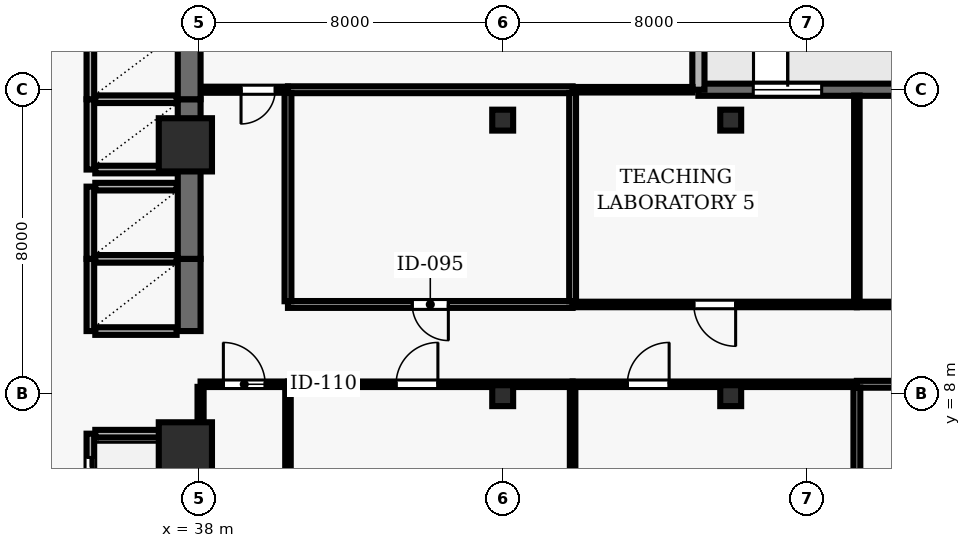
"""IFC4 building model, lengths in metres.
Left out: names, types, materials, properties, quantities, classifications, styles, units other than length and angle.
Written with IfcOpenShell. Run it as: python <this file> out.ifc"""

import sys

from ifc_helpers import new_model, si_unit, direction, frame, frame_2d, origin, origin_2d, place, context, subcontext, project, spatial, rectangle, hollow_rectangle, extrude, element, fill, save


model = new_model("IFC4")
c1 = context("Model", 3, precision=1e-05, world=origin(), true_north=direction((0.0, 1.0)))
c2 = subcontext(c1, "Body", "Model", "MODEL_VIEW")
j1 = project(units=[si_unit("LENGTHUNIT", "METRE"), si_unit("PLANEANGLEUNIT", "RADIAN")], contexts=[c1])
p1 = place(None, origin())
s1 = spatial("IfcSite", under=j1, at=p1, CompositionType="ELEMENT")
p2 = place(p1, origin())
s2 = spatial("IfcBuilding", under=s1, at=p2, CompositionType="ELEMENT")
p3 = place(p2, frame((0.0, 0.0, 62.2)))
s3 = spatial("IfcBuildingStorey", under=s2, at=p3, CompositionType="ELEMENT", Elevation=62.2)
for number, where, z_axis, x_axis in (
    (1, (37.65, 6.55, 0.0), (0.0, 0.0, 1.0), (1.0, 0.0, 0.0)),
    (2, (37.65, 14.55, 0.0), (0.0, 0.0, 1.0), (1.0, 0.0, 0.0)),
):
    element("IfcColumn", number, at=place(p3, frame(where, z_axis=z_axis, x_axis=x_axis)), inside=s3, PredefinedType="COLUMN", context=c2, shape_type="SweptSolid", body=[
        extrude(rectangle(XDim=1.4, YDim=1.4, at=origin_2d()), origin(), (0.0, 0.0, 1.0), 3.9),
    ])
for number, where, z_axis, x_axis in (
    (3, (46.0, 7.95, 0.0), (0.0, 0.0, 1.0), (1.0, 0.0, 0.0)),
    (4, (46.0, 15.2, 0.0), (0.0, 0.0, 1.0), (1.0, 0.0, 0.0)),
    (5, (52.0, 7.95, 0.0), (0.0, 0.0, 1.0), (1.0, 0.0, 0.0)),
    (6, (52.0, 15.2, 0.0), (0.0, 0.0, 1.0), (1.0, 0.0, 0.0)),
):
    element("IfcColumn", number, at=place(p3, frame(where, z_axis=z_axis, x_axis=x_axis)), inside=s3, PredefinedType="COLUMN", context=c2, shape_type="SweptSolid", body=[
        extrude(hollow_rectangle(XDim=0.55, YDim=0.55, WallThickness=0.025, at=origin_2d()), origin(), (0.0, 0.0, 1.0), 3.9),
    ])
p4 = place(p3, frame((73.5, 16.0, 0.0), z_axis=(0.0, 0.0, 1.0), x_axis=(-1.0, 0.0, 0.0)))
e7 = element("IfcWall", 7, at=p4, inside=s3, PredefinedType="SOLIDWALL", context=c2, shape_type="SweptSolid", body=[
    extrude(rectangle(XDim=22.35, YDim=0.32, at=frame_2d((11.175, 0.0))), origin(), (0.0, 0.0, 1.0), 3.69),
])
p5 = place(p4, frame((12.05, 0.0, 0.0)))
e8 = element("IfcOpeningElement", 8, at=p5, cuts=e7, PredefinedType="OPENING", context=c2, shape_type="SweptSolid", body=[
    extrude(rectangle(XDim=1.0, YDim=2.2, at=frame_2d((0.5, 1.1))), frame((0.0, 0.17, 0.0), z_axis=(0.0, -1.0, 0.0), x_axis=(1.0, 0.0, 0.0)), (0.0, 0.0, 1.0), 0.34),
])
p6 = place(p4, frame((1.444, 0.0, 0.9)))
e9 = element("IfcOpeningElement", 9, at=p6, cuts=e7, PredefinedType="OPENING", context=c2, shape_type="SweptSolid", body=[
    extrude(rectangle(XDim=1.8, YDim=1.8, at=frame_2d((0.9, 0.9))), frame((0.0, 0.17, 0.0), z_axis=(0.0, -1.0, 0.0), x_axis=(1.0, 0.0, 0.0)), (0.0, 0.0, 1.0), 0.34),
])
p7 = place(p4, frame((7.481, 0.0, 0.9)))
e10 = element("IfcOpeningElement", 10, at=p7, cuts=e7, PredefinedType="OPENING", context=c2, shape_type="SweptSolid", body=[
    extrude(rectangle(XDim=1.8, YDim=1.8, at=frame_2d((0.9, 0.9))), frame((0.0, 0.17, 0.0), z_axis=(0.0, -1.0, 0.0), x_axis=(1.0, 0.0, 0.0)), (0.0, 0.0, 1.0), 0.34),
])
p8 = place(p4, frame((19.106, 0.0, 0.9)))
e11 = element("IfcOpeningElement", 11, at=p8, cuts=e7, PredefinedType="OPENING", context=c2, shape_type="SweptSolid", body=[
    extrude(rectangle(XDim=1.8, YDim=1.8, at=frame_2d((0.9, 0.9))), frame((0.0, 0.17, 0.0), z_axis=(0.0, -1.0, 0.0), x_axis=(1.0, 0.0, 0.0)), (0.0, 0.0, 1.0), 0.34),
])
p9 = place(p3, frame((51.15, 16.0, 0.0), z_axis=(0.0, 0.0, 1.0), x_axis=(0.0, 1.0, 0.0)))
e12 = element("IfcWall", 12, at=p9, inside=s3, PredefinedType="SOLIDWALL", context=c2, shape_type="SweptSolid", body=[
    extrude(rectangle(XDim=9.442, YDim=0.32, at=frame_2d((4.721, 0.0))), origin(), (0.0, 0.0, 1.0), 3.69),
])
p10 = place(p9, frame((4.046, 0.0, 0.0)))
e13 = element("IfcOpeningElement", 13, at=p10, cuts=e12, PredefinedType="OPENING", context=c2, shape_type="SweptSolid", body=[
    extrude(rectangle(XDim=1.35, YDim=2.2, at=frame_2d((0.675, 1.1))), frame((0.0, 0.17, 0.0), z_axis=(0.0, -1.0, 0.0), x_axis=(1.0, 0.0, 0.0)), (0.0, 0.0, 1.0), 0.34),
])
p11 = place(p3, frame((35.15, 6.95, 0.0), z_axis=(0.0, 0.0, 1.0), x_axis=(0.0, -1.0, 0.0)))
e14 = element("IfcWall", 14, at=p11, inside=s3, PredefinedType="SOLIDWALL", context=c2, shape_type="SweptSolid", body=[
    extrude(rectangle(XDim=2.25, YDim=0.2, at=frame_2d((1.125, 0.0))), origin(), (0.0, 0.0, 1.0), 3.69),
])
p12 = place(p11, frame((0.625, 0.0, 0.0)))
e15 = element("IfcOpeningElement", 15, at=p12, cuts=e14, PredefinedType="OPENING", context=c2, shape_type="SweptSolid", body=[
    extrude(rectangle(XDim=1.0, YDim=2.1, at=frame_2d((0.5, 1.05))), frame((0.0, 0.11, 0.0), z_axis=(0.0, -1.0, 0.0), x_axis=(1.0, 0.0, 0.0)), (0.0, 0.0, 1.0), 0.22),
])
p13 = place(p3, frame((37.75, 4.7, 0.0), z_axis=(0.0, 0.0, 1.0), x_axis=(0.0, 1.0, 0.0)))
e16 = element("IfcWall", 16, at=p13, inside=s3, PredefinedType="SHEAR", context=c2, shape_type="SweptSolid", body=[
    extrude(rectangle(XDim=2.25, YDim=0.6, at=frame_2d((1.125, 0.0))), origin(), (0.0, 0.0, 1.0), 3.69),
])
p14 = place(p3, frame((37.42, 6.95, 0.0), z_axis=(0.0, 0.0, 1.0), x_axis=(-1.0, 0.0, 0.0)))
e17 = element("IfcWall", 17, at=p14, inside=s3, PredefinedType="SOLIDWALL", context=c2, shape_type="SweptSolid", body=[
    extrude(rectangle(XDim=2.14, YDim=0.2, at=frame_2d((1.07, 0.0))), origin(), (0.0, 0.0, 1.0), 3.69),
])
p15 = place(p3, frame((35.15, 11.55, 0.0), z_axis=(0.0, 0.0, 1.0), x_axis=(0.0, -1.0, 0.0)))
e18 = element("IfcWall", 18, at=p15, inside=s3, PredefinedType="SOLIDWALL", context=c2, shape_type="SweptSolid", body=[
    extrude(rectangle(XDim=1.9, YDim=0.2, at=frame_2d((0.95, 0.0))), origin(), (0.0, 0.0, 1.0), 3.69),
])
p16 = place(p3, frame((37.75, 9.65, 0.0), z_axis=(0.0, 0.0, 1.0), x_axis=(0.0, 1.0, 0.0)))
e19 = element("IfcWall", 19, at=p16, inside=s3, PredefinedType="SHEAR", context=c2, shape_type="SweptSolid", body=[
    extrude(rectangle(XDim=1.9, YDim=0.6, at=frame_2d((0.95, 0.0))), origin(), (0.0, 0.0, 1.0), 3.69),
])
for number, where, z_axis, x_axis in (
    (20, (35.28, 9.65, 0.0), (0.0, 0.0, 1.0), (1.0, 0.0, 0.0)),
    (21, (37.42, 11.55, 0.0), (0.0, 0.0, 1.0), (-1.0, 0.0, 0.0)),
):
    element("IfcWall", number, at=place(p3, frame(where, z_axis=z_axis, x_axis=x_axis)), inside=s3, PredefinedType="SOLIDWALL", context=c2, shape_type="SweptSolid", body=[
        extrude(rectangle(XDim=2.14, YDim=0.2, at=frame_2d((1.07, 0.0))), origin(), (0.0, 0.0, 1.0), 3.69),
    ])
p17 = place(p3, frame((35.15, 13.45, 0.0), z_axis=(0.0, 0.0, 1.0), x_axis=(0.0, -1.0, 0.0)))
e22 = element("IfcWall", 22, at=p17, inside=s3, PredefinedType="SOLIDWALL", context=c2, shape_type="SweptSolid", body=[
    extrude(rectangle(XDim=1.9, YDim=0.2, at=frame_2d((0.95, 0.0))), origin(), (0.0, 0.0, 1.0), 3.69),
])
p18 = place(p3, frame((37.75, 11.55, 0.0), z_axis=(0.0, 0.0, 1.0), x_axis=(0.0, 1.0, 0.0)))
e23 = element("IfcWall", 23, at=p18, inside=s3, PredefinedType="SHEAR", context=c2, shape_type="SweptSolid", body=[
    extrude(rectangle(XDim=2.35, YDim=0.6, at=frame_2d((1.175, 0.0))), origin(), (0.0, 0.0, 1.0), 3.69),
])
p19 = place(p3, frame((37.42, 13.45, 0.0), z_axis=(0.0, 0.0, 1.0), x_axis=(-1.0, 0.0, 0.0)))
e24 = element("IfcWall", 24, at=p19, inside=s3, PredefinedType="SOLIDWALL", context=c2, shape_type="SweptSolid", body=[
    extrude(rectangle(XDim=2.14, YDim=0.2, at=frame_2d((1.07, 0.0))), origin(), (0.0, 0.0, 1.0), 3.69),
])
p20 = place(p3, frame((35.15, 15.75, 0.0), z_axis=(0.0, 0.0, 1.0), x_axis=(0.0, -1.0, 0.0)))
e25 = element("IfcWall", 25, at=p20, inside=s3, PredefinedType="SOLIDWALL", context=c2, shape_type="SweptSolid", body=[
    extrude(rectangle(XDim=1.85, YDim=0.2, at=frame_2d((0.925, 0.0))), origin(), (0.0, 0.0, 1.0), 3.69),
])
p21 = place(p3, frame((37.75, 13.9, 0.0), z_axis=(0.0, 0.0, 1.0), x_axis=(0.0, 1.0, 0.0)))
e26 = element("IfcWall", 26, at=p21, inside=s3, PredefinedType="SHEAR", context=c2, shape_type="SweptSolid", body=[
    extrude(rectangle(XDim=1.85, YDim=0.6, at=frame_2d((0.925, 0.0))), origin(), (0.0, 0.0, 1.0), 3.69),
])
for number, where, z_axis, x_axis in (
    (27, (35.28, 13.9, 0.0), (0.0, 0.0, 1.0), (1.0, 0.0, 0.0)),
    (28, (37.42, 15.75, 0.0), (0.0, 0.0, 1.0), (-1.0, 0.0, 0.0)),
):
    element("IfcWall", number, at=place(p3, frame(where, z_axis=z_axis, x_axis=x_axis)), inside=s3, PredefinedType="SOLIDWALL", context=c2, shape_type="SweptSolid", body=[
        extrude(rectangle(XDim=2.14, YDim=0.2, at=frame_2d((1.07, 0.0))), origin(), (0.0, 0.0, 1.0), 3.69),
    ])
p22 = place(p3, frame((35.15, 17.6, 0.0), z_axis=(0.0, 0.0, 1.0), x_axis=(0.0, -1.0, 0.0)))
e29 = element("IfcWall", 29, at=p22, inside=s3, PredefinedType="SOLIDWALL", context=c2, shape_type="SweptSolid", body=[
    extrude(rectangle(XDim=1.85, YDim=0.2, at=frame_2d((0.925, 0.0))), origin(), (0.0, 0.0, 1.0), 3.69),
])
p23 = place(p3, frame((37.75, 15.75, 0.0), z_axis=(0.0, 0.0, 1.0), x_axis=(0.0, 1.0, 0.0)))
e30 = element("IfcWall", 30, at=p23, inside=s3, PredefinedType="SHEAR", context=c2, shape_type="SweptSolid", body=[
    extrude(rectangle(XDim=1.85, YDim=0.6, at=frame_2d((0.925, 0.0))), origin(), (0.0, 0.0, 1.0), 3.69),
])
p24 = place(p3, frame((38.05, 8.25, 0.0), z_axis=(0.0, 0.0, 1.0), x_axis=(1.0, 0.0, 0.0)))
e31 = element("IfcWall", 31, at=p24, inside=s3, PredefinedType="PARTITIONING", context=c2, shape_type="SweptSolid", body=[
    extrude(rectangle(XDim=2.3, YDim=0.145, at=frame_2d((1.15, 0.0))), origin(), (0.0, 0.0, 1.0), 2.995),
])
p25 = place(p24, frame((0.6, 0.0, 0.0)))
e32 = element("IfcOpeningElement", 32, at=p25, cuts=e31, PredefinedType="OPENING", context=c2, shape_type="SweptSolid", body=[
    extrude(rectangle(XDim=1.1, YDim=2.15, at=frame_2d((0.55, 1.075))), frame((0.0, 0.083, 0.0), z_axis=(0.0, -1.0, 0.0), x_axis=(1.0, 0.0, 0.0)), (0.0, 0.0, 1.0), 0.165),
])
p26 = place(p3, frame((40.35, 8.25, 0.0), z_axis=(0.0, 0.0, 1.0), x_axis=(1.0, 0.0, 0.0)))
e33 = element("IfcWall", 33, at=p26, inside=s3, PredefinedType="PARTITIONING", context=c2, shape_type="SweptSolid", body=[
    extrude(rectangle(XDim=7.49, YDim=0.145, at=frame_2d((3.745, 0.0))), origin(), (0.0, 0.0, 1.0), 2.995),
])
p27 = place(p26, frame((2.845, 0.0, 0.0)))
e34 = element("IfcOpeningElement", 34, at=p27, cuts=e33, PredefinedType="OPENING", context=c2, shape_type="SweptSolid", body=[
    extrude(rectangle(XDim=1.1, YDim=2.15, at=frame_2d((0.55, 1.075))), frame((0.0, 0.083, 0.0), z_axis=(0.0, -1.0, 0.0), x_axis=(1.0, 0.0, 0.0)), (0.0, 0.0, 1.0), 0.165),
])
p28 = place(p3, frame((40.35, 16.0, 0.0), z_axis=(0.0, 0.0, 1.0), x_axis=(-1.0, 0.0, 0.0)))
e35 = element("IfcWall", 35, at=p28, inside=s3, PredefinedType="PARTITIONING", context=c2, shape_type="SweptSolid", body=[
    extrude(rectangle(XDim=2.27, YDim=0.16, at=frame_2d((1.135, 0.0))), origin(), (0.0, 0.0, 1.0), 3.69),
])
p29 = place(p28, frame((0.335, 0.0, 0.0)))
e36 = element("IfcOpeningElement", 36, at=p29, cuts=e35, PredefinedType="OPENING", context=c2, shape_type="SweptSolid", body=[
    extrude(rectangle(XDim=0.9, YDim=2.1, at=frame_2d((0.45, 1.05))), frame((0.0, 0.09, 0.0), z_axis=(0.0, -1.0, 0.0), x_axis=(1.0, 0.0, 0.0)), (0.0, 0.0, 1.0), 0.18),
])
p30 = place(p3, frame((47.84, 8.25, 0.0), z_axis=(0.0, 0.0, 1.0), x_axis=(1.0, 0.0, 0.0)))
e37 = element("IfcWall", 37, at=p30, inside=s3, PredefinedType="PARTITIONING", context=c2, shape_type="SweptSolid", body=[
    extrude(rectangle(XDim=7.48, YDim=0.145, at=frame_2d((3.74, 0.0))), origin(), (0.0, 0.0, 1.0), 2.995),
])
p31 = place(p30, frame((1.44, 0.0, 0.0)))
e38 = element("IfcOpeningElement", 38, at=p31, cuts=e37, PredefinedType="OPENING", context=c2, shape_type="SweptSolid", body=[
    extrude(rectangle(XDim=1.1, YDim=2.15, at=frame_2d((0.55, 1.075))), frame((0.0, 0.083, 0.0), z_axis=(0.0, -1.0, 0.0), x_axis=(1.0, 0.0, 0.0)), (0.0, 0.0, 1.0), 0.165),
])
p32 = place(p3, frame((47.84, 10.35, 0.0), z_axis=(0.0, 0.0, 1.0), x_axis=(-1.0, 0.0, 0.0)))
e39 = element("IfcWall", 39, at=p32, inside=s3, PredefinedType="PARTITIONING", context=c2, shape_type="SweptSolid", body=[
    extrude(rectangle(XDim=7.49, YDim=0.18, at=frame_2d((3.745, 0.0))), origin(), (0.0, 0.0, 1.0), 3.227),
])
p33 = place(p32, frame((3.27, 0.0, 0.0)))
e40 = element("IfcOpeningElement", 40, at=p33, cuts=e39, PredefinedType="OPENING", context=c2, shape_type="SweptSolid", body=[
    extrude(rectangle(XDim=0.95, YDim=2.1, at=frame_2d((0.475, 1.05))), frame((0.0, 0.1, 0.0), z_axis=(0.0, -1.0, 0.0), x_axis=(1.0, 0.0, 0.0)), (0.0, 0.0, 1.0), 0.2),
])
p34 = place(p3, frame((47.84, 16.0, 0.0), z_axis=(0.0, 0.0, 1.0), x_axis=(1.0, 0.0, 0.0)))
e41 = element("IfcWall", 41, at=p34, inside=s3, PredefinedType="PARTITIONING", context=c2, shape_type="SweptSolid", body=[
    extrude(rectangle(XDim=3.155, YDim=0.145, at=frame_2d((1.578, 0.0))), origin(), (0.0, 0.0, 1.0), 3.69),
])
p35 = place(p3, frame((47.84, 16.0, 0.0), z_axis=(0.0, 0.0, 1.0), x_axis=(-1.0, 0.0, 0.0)))
e42 = element("IfcWall", 42, at=p35, inside=s3, PredefinedType="PARTITIONING", context=c2, shape_type="SweptSolid", body=[
    extrude(rectangle(XDim=7.49, YDim=0.18, at=frame_2d((3.745, 0.0))), origin(), (0.0, 0.0, 1.0), 3.69),
])
p36 = place(p3, frame((55.32, 8.25, 0.0), z_axis=(0.0, 0.0, 1.0), x_axis=(1.0, 0.0, 0.0)))
e43 = element("IfcWall", 43, at=p36, inside=s3, PredefinedType="PARTITIONING", context=c2, shape_type="SweptSolid", body=[
    extrude(rectangle(XDim=7.88, YDim=0.18, at=frame_2d((3.94, 0.0))), origin(), (0.0, 0.0, 1.0), 2.995),
])
p37 = place(p36, frame((4.165, 0.0, 0.0)))
e44 = element("IfcOpeningElement", 44, at=p37, cuts=e43, PredefinedType="OPENING", context=c2, shape_type="SweptSolid", body=[
    extrude(rectangle(XDim=0.95, YDim=2.1, at=frame_2d((0.475, 1.05))), frame((0.0, 0.1, 0.0), z_axis=(0.0, -1.0, 0.0), x_axis=(1.0, 0.0, 0.0)), (0.0, 0.0, 1.0), 0.2),
])
p38 = place(p3, frame((55.32, 10.35, 0.0), z_axis=(0.0, 0.0, 1.0), x_axis=(-1.0, 0.0, 0.0)))
e45 = element("IfcWall", 45, at=p38, inside=s3, PredefinedType="PARTITIONING", context=c2, shape_type="SweptSolid", body=[
    extrude(rectangle(XDim=7.48, YDim=0.145, at=frame_2d((3.74, 0.0))), origin(), (0.0, 0.0, 1.0), 3.227),
])
p39 = place(p38, frame((3.19, 0.0, 0.0)))
e46 = element("IfcOpeningElement", 46, at=p39, cuts=e45, PredefinedType="OPENING", context=c2, shape_type="SweptSolid", body=[
    extrude(rectangle(XDim=1.1, YDim=2.15, at=frame_2d((0.55, 1.075))), frame((0.0, 0.083, 0.0), z_axis=(0.0, -1.0, 0.0), x_axis=(1.0, 0.0, 0.0)), (0.0, 0.0, 1.0), 0.165),
])
p40 = place(p3, frame((63.2, 10.35, 0.0), z_axis=(0.0, 0.0, 1.0), x_axis=(-1.0, 0.0, 0.0)))
e47 = element("IfcWall", 47, at=p40, inside=s3, PredefinedType="PARTITIONING", context=c2, shape_type="SweptSolid", body=[
    extrude(rectangle(XDim=7.88, YDim=0.145, at=frame_2d((3.94, 0.0))), origin(), (0.0, 0.0, 1.0), 3.227),
])
p41 = place(p40, frame((3.39, 0.0, 0.0)))
e48 = element("IfcOpeningElement", 48, at=p41, cuts=e47, PredefinedType="OPENING", context=c2, shape_type="SweptSolid", body=[
    extrude(rectangle(XDim=1.1, YDim=2.15, at=frame_2d((0.55, 1.075))), frame((0.0, 0.083, 0.0), z_axis=(0.0, -1.0, 0.0), x_axis=(1.0, 0.0, 0.0)), (0.0, 0.0, 1.0), 0.165),
])
p42 = place(p3, frame((38.05, 7.05, 0.0), z_axis=(0.0, 0.0, 1.0), x_axis=(0.0, 1.0, 0.0)))
e49 = element("IfcWall", 49, at=p42, inside=s3, PredefinedType="PARTITIONING", context=c2, shape_type="SweptSolid", body=[
    extrude(rectangle(XDim=1.132, YDim=0.16, at=frame_2d((0.566, 0.0))), origin(), (0.0, 0.0, 1.0), 2.995),
])
p43 = place(p3, frame((40.35, 0.155, 0.0), z_axis=(0.0, 0.0, 1.0), x_axis=(0.0, 1.0, 0.0)))
e50 = element("IfcWall", 50, at=p43, inside=s3, PredefinedType="PARTITIONING", context=c2, shape_type="SweptSolid", body=[
    extrude(rectangle(XDim=8.027, YDim=0.145, at=frame_2d((4.013, 0.0))), origin(), (0.0, 0.0, 1.0), 3.69),
])
p44 = place(p3, frame((40.35, 10.435, 0.0), z_axis=(0.0, 0.0, 1.0), x_axis=(0.0, 1.0, 0.0)))
e51 = element("IfcWall", 51, at=p44, inside=s3, PredefinedType="PARTITIONING", context=c2, shape_type="SweptSolid", body=[
    extrude(rectangle(XDim=5.48, YDim=0.18, at=frame_2d((2.74, 0.0))), origin(), (0.0, 0.0, 1.0), 3.227),
])
p45 = place(p3, frame((47.84, 0.155, 0.0), z_axis=(0.0, 0.0, 1.0), x_axis=(0.0, 1.0, 0.0)))
e52 = element("IfcWall", 52, at=p45, inside=s3, PredefinedType="PARTITIONING", context=c2, shape_type="SweptSolid", body=[
    extrude(rectangle(XDim=8.027, YDim=0.145, at=frame_2d((4.013, 0.0))), origin(), (0.0, 0.0, 1.0), 3.69),
])
p46 = place(p3, frame((47.84, 10.435, 0.0), z_axis=(0.0, 0.0, 1.0), x_axis=(0.0, 1.0, 0.0)))
e53 = element("IfcWall", 53, at=p46, inside=s3, PredefinedType="PARTITIONING", context=c2, shape_type="SweptSolid", body=[
    extrude(rectangle(XDim=5.48, YDim=0.18, at=frame_2d((2.74, 0.0))), origin(), (0.0, 0.0, 1.0), 3.69),
])
p47 = place(p3, frame((55.32, 0.155, 0.0), z_axis=(0.0, 0.0, 1.0), x_axis=(0.0, 1.0, 0.0)))
e54 = element("IfcWall", 54, at=p47, inside=s3, PredefinedType="PARTITIONING", context=c2, shape_type="SweptSolid", body=[
    extrude(rectangle(XDim=8.01, YDim=0.18, at=frame_2d((4.005, 0.0))), origin(), (0.0, 0.0, 1.0), 3.69),
])
p48 = place(p3, frame((55.32, 10.418, 0.0), z_axis=(0.0, 0.0, 1.0), x_axis=(0.0, 1.0, 0.0)))
e55 = element("IfcWall", 55, at=p48, inside=s3, PredefinedType="PARTITIONING", context=c2, shape_type="SweptSolid", body=[
    extrude(rectangle(XDim=5.427, YDim=0.145, at=frame_2d((2.713, 0.0))), origin(), (0.0, 0.0, 1.0), 3.69),
])
p49 = place(p8, origin())
e56 = element("IfcWindow", 56, at=p49, inside=s3, PartitioningType="SINGLE_PANEL", PredefinedType="WINDOW", context=c2, shape_type="SweptSolid", body=[
    extrude(rectangle(XDim=1.8, YDim=1.8, at=frame_2d((0.9, 0.9))), frame((0.0, 0.03, 0.0), z_axis=(0.0, -1.0, 0.0), x_axis=(1.0, 0.0, 0.0)), (0.0, 0.0, 1.0), 0.06),
])
fill(e11, e56)
p50 = place(p12, origin())
e57 = element("IfcDoor", 57, at=p50, inside=s3, OperationType="DOUBLE_DOOR_SLIDING", PredefinedType="DOOR", context=c2, shape_type="SweptSolid", body=[
    extrude(rectangle(XDim=1.0, YDim=2.1, at=frame_2d((0.5, 1.05))), frame((0.0, 0.025, 0.0), z_axis=(0.0, -1.0, 0.0), x_axis=(1.0, 0.0, 0.0)), (0.0, 0.0, 1.0), 0.05),
])
fill(e15, e57)
p51 = place(p25, origin())
e58 = element("IfcDoor", 58, at=p51, inside=s3, OperationType="SINGLE_SWING_LEFT", PredefinedType="DOOR", context=c2, shape_type="SweptSolid", body=[
    extrude(rectangle(XDim=1.1, YDim=2.15, at=frame_2d((0.55, 1.075))), frame((0.0, 0.025, 0.0), z_axis=(0.0, -1.0, 0.0), x_axis=(1.0, 0.0, 0.0)), (0.0, 0.0, 1.0), 0.05),
])
fill(e32, e58)
p52 = place(p27, origin())
e59 = element("IfcDoor", 59, at=p52, inside=s3, OperationType="SINGLE_SWING_RIGHT", PredefinedType="DOOR", context=c2, shape_type="SweptSolid", body=[
    extrude(rectangle(XDim=1.1, YDim=2.15, at=frame_2d((0.55, 1.075))), frame((0.0, 0.025, 0.0), z_axis=(0.0, -1.0, 0.0), x_axis=(1.0, 0.0, 0.0)), (0.0, 0.0, 1.0), 0.05),
])
fill(e34, e59)
p53 = place(p33, origin())
e60 = element("IfcDoor", 60, at=p53, inside=s3, OperationType="SINGLE_SWING_LEFT", PredefinedType="DOOR", context=c2, shape_type="SweptSolid", body=[
    extrude(rectangle(XDim=0.95, YDim=2.1, at=frame_2d((0.475, 1.05))), frame((0.0, 0.025, 0.0), z_axis=(0.0, -1.0, 0.0), x_axis=(1.0, 0.0, 0.0)), (0.0, 0.0, 1.0), 0.05),
])
fill(e40, e60)
p54 = place(p31, origin())
e61 = element("IfcDoor", 61, at=p54, inside=s3, OperationType="SINGLE_SWING_RIGHT", PredefinedType="DOOR", context=c2, shape_type="SweptSolid", body=[
    extrude(rectangle(XDim=1.1, YDim=2.15, at=frame_2d((0.55, 1.075))), frame((0.0, 0.025, 0.0), z_axis=(0.0, -1.0, 0.0), x_axis=(1.0, 0.0, 0.0)), (0.0, 0.0, 1.0), 0.05),
])
fill(e38, e61)
p55 = place(p39, origin())
e62 = element("IfcDoor", 62, at=p55, inside=s3, OperationType="SINGLE_SWING_LEFT", PredefinedType="DOOR", context=c2, shape_type="SweptSolid", body=[
    extrude(rectangle(XDim=1.1, YDim=2.15, at=frame_2d((0.55, 1.075))), frame((0.0, 0.025, 0.0), z_axis=(0.0, -1.0, 0.0), x_axis=(1.0, 0.0, 0.0)), (0.0, 0.0, 1.0), 0.05),
])
fill(e46, e62)
p56 = place(p29, origin())
e63 = element("IfcDoor", 63, at=p56, inside=s3, OperationType="SINGLE_SWING_RIGHT", PredefinedType="DOOR", context=c2, shape_type="SweptSolid", body=[
    extrude(rectangle(XDim=0.9, YDim=2.1, at=frame_2d((0.45, 1.05))), frame((0.0, 0.025, 0.0), z_axis=(0.0, -1.0, 0.0), x_axis=(1.0, 0.0, 0.0)), (0.0, 0.0, 1.0), 0.05),
])
fill(e36, e63)
save(model, sys.argv[1])
